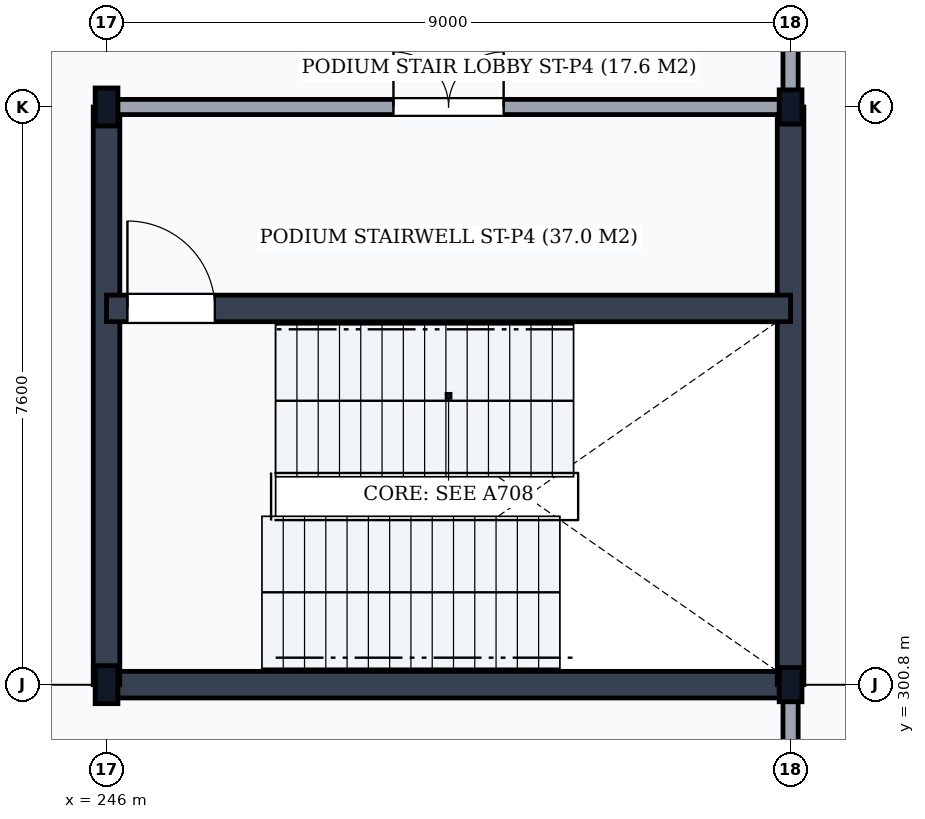
"""IFC4 building model, lengths in metres.
Left out: names, types, materials, properties, quantities, classifications, styles, units other than length and angle.
Written with IfcOpenShell. Run it as: python <this file> out.ifc"""

import sys

from ifc_helpers import new_model, si_unit, direction, frame, frame_2d, origin, origin_2d, place, context, subcontext, project, spatial, rectangle, i_section, extrude, element, fill, save


model = new_model("IFC4")
c1 = context("Model", 3, precision=1e-05, world=origin(), true_north=direction((0.0, 1.0)))
c2 = subcontext(c1, "Body", "Model", "MODEL_VIEW")
j1 = project(units=[si_unit("LENGTHUNIT", "METRE"), si_unit("PLANEANGLEUNIT", "RADIAN")], contexts=[c1])
p1 = place(None, origin())
s1 = spatial("IfcSite", under=j1, at=p1, CompositionType="ELEMENT")
p2 = place(p1, origin())
s2 = spatial("IfcBuilding", under=s1, at=p2, CompositionType="ELEMENT")
p3 = place(p2, origin())
s3 = spatial("IfcBuildingStorey", under=s2, at=p3, CompositionType="ELEMENT", Elevation=0.0)
for number, where, z_axis, x_axis in (
    (1, (246.0, 300.8, 0.0), (0.0, 0.0, 1.0), (1.0, 0.0, 0.0)),
    (2, (246.0, 308.4, 0.0), (0.0, 0.0, 1.0), (1.0, 0.0, 0.0)),
):
    element("IfcColumn", number, at=place(p3, frame(where, z_axis=z_axis, x_axis=x_axis)), inside=s3, PredefinedType="COLUMN", context=c2, shape_type="SweptSolid", body=[
        extrude(i_section(OverallWidth=0.3, OverallDepth=0.5, WebThickness=0.014, FlangeThickness=0.028, FilletRadius=0.027, at=origin_2d()), origin(), (0.0, 0.0, 1.0), 5.4),
    ])
for number, where, z_axis, x_axis in (
    (3, (255.0, 300.8, 0.0), (0.0, 0.0, 1.0), (1.0, 0.0, 0.0)),
    (4, (255.0, 308.4, 0.0), (0.0, 0.0, 1.0), (1.0, 0.0, 0.0)),
):
    element("IfcColumn", number, at=place(p3, frame(where, z_axis=z_axis, x_axis=x_axis)), inside=s3, PredefinedType="COLUMN", context=c2, shape_type="SweptSolid", body=[
        extrude(i_section(OverallWidth=0.3, OverallDepth=0.45, WebThickness=0.014, FlangeThickness=0.026, FilletRadius=0.027, at=origin_2d()), origin(), (0.0, 0.0, 1.0), 5.4),
    ])
p4 = place(p3, frame((246.0, 300.8, 0.0), z_axis=(0.0, 0.0, 1.0), x_axis=(1.0, 0.0, 0.0)))
e5 = element("IfcWall", 5, at=p4, inside=s3, PredefinedType="SHEAR", context=c2, shape_type="SweptSolid", body=[
    extrude(rectangle(XDim=9.0, YDim=0.35, at=frame_2d((4.5, 0.0))), origin(), (0.0, 0.0, 1.0), 5.14),
])
for number, where, z_axis, x_axis in (
    (6, (246.0, 300.8, 0.0), (0.0, 0.0, 1.0), (0.0, 1.0, 0.0)),
    (7, (255.0, 300.8, 0.0), (0.0, 0.0, 1.0), (0.0, 1.0, 0.0)),
):
    element("IfcWall", number, at=place(p3, frame(where, z_axis=z_axis, x_axis=x_axis)), inside=s3, PredefinedType="SHEAR", context=c2, shape_type="SweptSolid", body=[
        extrude(rectangle(XDim=7.6, YDim=0.35, at=frame_2d((3.8, 0.0))), origin(), (0.0, 0.0, 1.0), 5.14),
    ])
p5 = place(p3, frame((246.0, 305.75, 0.0), z_axis=(0.0, 0.0, 1.0), x_axis=(1.0, 0.0, 0.0)))
e8 = element("IfcWall", 8, at=p5, inside=s3, PredefinedType="SHEAR", context=c2, shape_type="SweptSolid", body=[
    extrude(rectangle(XDim=9.0, YDim=0.35, at=frame_2d((4.5, 0.0))), origin(), (0.0, 0.0, 1.0), 5.14),
])
p6 = place(p5, frame((0.275, 0.0, 0.0)))
e9 = element("IfcOpeningElement", 9, at=p6, cuts=e8, PredefinedType="OPENING", context=c2, shape_type="SweptSolid", body=[
    extrude(rectangle(XDim=1.15, YDim=2.15, at=frame_2d((0.575, 1.075))), frame((0.0, 0.19, 0.0), z_axis=(0.0, -1.0, 0.0), x_axis=(1.0, 0.0, 0.0)), (0.0, 0.0, 1.0), 0.38),
])
p7 = place(p3, frame((246.0, 308.4, 0.0), z_axis=(0.0, 0.0, 1.0), x_axis=(1.0, 0.0, 0.0)))
e10 = element("IfcWall", 10, at=p7, inside=s3, PredefinedType="PARTITIONING", context=c2, shape_type="SweptSolid", body=[
    extrude(rectangle(XDim=9.0, YDim=0.2, at=frame_2d((4.5, 0.0))), origin(), (0.0, 0.0, 1.0), 4.588),
])
p8 = place(p7, frame((3.775, 0.0, 0.0)))
e11 = element("IfcOpeningElement", 11, at=p8, cuts=e10, PredefinedType="OPENING", context=c2, shape_type="SweptSolid", body=[
    extrude(rectangle(XDim=1.45, YDim=2.2, at=frame_2d((0.725, 1.1))), frame((0.0, 0.115, 0.0), z_axis=(0.0, -1.0, 0.0), x_axis=(1.0, 0.0, 0.0)), (0.0, 0.0, 1.0), 0.23),
])
p9 = place(p3, frame((255.0, 258.2, 0.0), z_axis=(0.0, 0.0, 1.0), x_axis=(0.0, 1.0, 0.0)))
e12 = element("IfcWall", 12, at=p9, inside=s3, PredefinedType="PARTITIONING", context=c2, shape_type="SweptSolid", body=[
    extrude(rectangle(XDim=42.6, YDim=0.2, at=frame_2d((21.3, 0.0))), origin(), (0.0, 0.0, 1.0), 2.118),
])
p10 = place(p9, frame((7.2, 0.0, 0.0)))
e13 = element("IfcOpeningElement", 13, at=p10, cuts=e12, PredefinedType="OPENING", context=c2, shape_type="SweptSolid", body=[
    extrude(rectangle(XDim=1.6, YDim=2.25, at=frame_2d((0.8, 1.125))), frame((0.0, 0.115, 0.0), z_axis=(0.0, -1.0, 0.0), x_axis=(1.0, 0.0, 0.0)), (0.0, 0.0, 1.0), 0.23),
])
p11 = place(p3, frame((255.0, 308.4, 0.0), z_axis=(0.0, 0.0, 1.0), x_axis=(0.0, 1.0, 0.0)))
e14 = element("IfcWall", 14, at=p11, inside=s3, PredefinedType="PARTITIONING", context=c2, shape_type="SweptSolid", body=[
    extrude(rectangle(XDim=45.6, YDim=0.2, at=frame_2d((22.8, 0.0))), origin(), (0.0, 0.0, 1.0), 4.688),
])
p12 = place(p11, frame((4.0, 0.0, 0.0)))
e15 = element("IfcOpeningElement", 15, at=p12, cuts=e14, PredefinedType="OPENING", context=c2, shape_type="SweptSolid", body=[
    extrude(rectangle(XDim=1.6, YDim=2.25, at=frame_2d((0.8, 1.125))), frame((0.0, 0.115, 0.0), z_axis=(0.0, -1.0, 0.0), x_axis=(1.0, 0.0, 0.0)), (0.0, 0.0, 1.0), 0.23),
])
p13 = place(p6, origin())
e16 = element("IfcDoor", 16, at=p13, inside=s3, OperationType="SINGLE_SWING_LEFT", PredefinedType="DOOR", context=c2, shape_type="SweptSolid", body=[
    extrude(rectangle(XDim=1.15, YDim=2.15, at=frame_2d((0.575, 1.075))), frame((0.0, 0.025, 0.0), z_axis=(0.0, -1.0, 0.0), x_axis=(1.0, 0.0, 0.0)), (0.0, 0.0, 1.0), 0.05),
])
fill(e9, e16)
p14 = place(p8, origin())
e17 = element("IfcDoor", 17, at=p14, inside=s3, OperationType="DOUBLE_DOOR_SINGLE_SWING", PredefinedType="DOOR", context=c2, shape_type="SweptSolid", body=[
    extrude(rectangle(XDim=1.45, YDim=2.2, at=frame_2d((0.725, 1.1))), frame((0.0, 0.025, 0.0), z_axis=(0.0, -1.0, 0.0), x_axis=(1.0, 0.0, 0.0)), (0.0, 0.0, 1.0), 0.05),
])
fill(e11, e17)
save(model, sys.argv[1])
